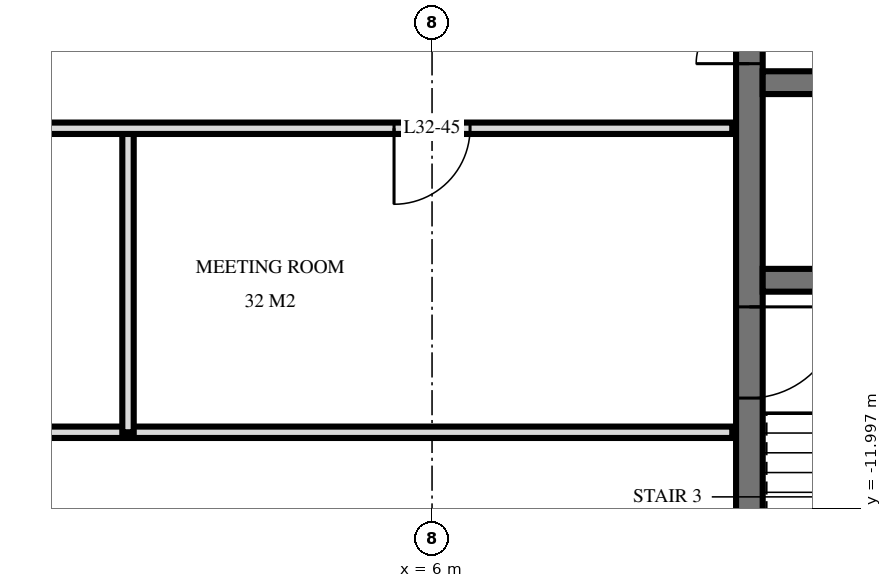
"""IFC4 building model, lengths in metres.
Left out: names, types, materials, properties, quantities, classifications, styles, units other than length and angle.
Written with IfcOpenShell. Run it as: python <this file> out.ifc"""

import sys

from ifc_helpers import new_model, si_unit, direction, frame, frame_2d, origin, place, context, subcontext, project, spatial, rectangle, extrude, element, fill, save


model = new_model("IFC4")
c1 = context("Model", 3, precision=1e-05, world=origin(), true_north=direction((0.0, 1.0)))
c2 = subcontext(c1, "Body", "Model", "MODEL_VIEW")
j1 = project(units=[si_unit("LENGTHUNIT", "METRE"), si_unit("PLANEANGLEUNIT", "RADIAN")], contexts=[c1])
p1 = place(None, origin())
s1 = spatial("IfcSite", under=j1, at=p1, CompositionType="ELEMENT")
p2 = place(p1, origin())
s2 = spatial("IfcBuilding", under=s1, at=p2, CompositionType="ELEMENT")
p3 = place(p2, frame((0.0, 0.0, 127.2)))
s3 = spatial("IfcBuildingStorey", under=s2, at=p3, CompositionType="ELEMENT", Elevation=127.2)
p4 = place(p3, frame((10.175, -14.55, 0.0), z_axis=(0.0, 0.0, 1.0), x_axis=(0.0, 1.0, 0.0)))
e1 = element("IfcWall", 1, at=p4, inside=s3, PredefinedType="SHEAR", context=c2, shape_type="SweptSolid", body=[
    extrude(rectangle(XDim=14.1, YDim=0.35, at=frame_2d((7.05, 0.0))), origin(), (0.0, 0.0, 1.0), 3.6),
])
p5 = place(p4, frame((8.4, 0.0, 0.0)))
e2 = element("IfcOpeningElement", 2, at=p5, cuts=e1, PredefinedType="OPENING", context=c2, shape_type="SweptSolid", body=[
    extrude(rectangle(XDim=1.4, YDim=2.4, at=frame_2d((0.7, 1.2))), frame((0.0, 0.185, 0.0), z_axis=(0.0, -1.0, 0.0), x_axis=(1.0, 0.0, 0.0)), (0.0, 0.0, 1.0), 0.37),
])
p6 = place(p4, frame((10.0, 0.0, 0.0)))
e3 = element("IfcOpeningElement", 3, at=p6, cuts=e1, PredefinedType="OPENING", context=c2, shape_type="SweptSolid", body=[
    extrude(rectangle(XDim=1.4, YDim=2.4, at=frame_2d((0.7, 1.2))), frame((0.0, 0.185, 0.0), z_axis=(0.0, -1.0, 0.0), x_axis=(1.0, 0.0, 0.0)), (0.0, 0.0, 1.0), 0.37),
])
p7 = place(p4, frame((4.0, 0.0, 0.0)))
e4 = element("IfcOpeningElement", 4, at=p7, cuts=e1, PredefinedType="OPENING", context=c2, shape_type="SweptSolid", body=[
    extrude(rectangle(XDim=1.2, YDim=2.1, at=frame_2d((0.6, 1.05))), frame((0.0, 0.185, 0.0), z_axis=(0.0, -1.0, 0.0), x_axis=(1.0, 0.0, 0.0)), (0.0, 0.0, 1.0), 0.37),
])
p8 = place(p3, frame((10.35, -6.4, 0.0), z_axis=(0.0, 0.0, 1.0), x_axis=(1.0, 0.0, 0.0)))
e5 = element("IfcWall", 5, at=p8, inside=s3, PredefinedType="SHEAR", context=c2, shape_type="SweptSolid", body=[
    extrude(rectangle(XDim=13.7, YDim=0.3, at=frame_2d((6.85, 0.0))), origin(), (0.0, 0.0, 1.0), 3.6),
])
p9 = place(p8, frame((12.05, 0.0, 0.0)))
e6 = element("IfcOpeningElement", 6, at=p9, cuts=e5, PredefinedType="OPENING", context=c2, shape_type="SweptSolid", body=[
    extrude(rectangle(XDim=1.1, YDim=2.1, at=frame_2d((0.55, 1.05))), frame((0.0, 0.16, 0.0), z_axis=(0.0, -1.0, 0.0), x_axis=(1.0, 0.0, 0.0)), (0.0, 0.0, 1.0), 0.32),
])
p10 = place(p8, frame((6.8, 0.0, 0.0)))
e7 = element("IfcOpeningElement", 7, at=p10, cuts=e5, PredefinedType="OPENING", context=c2, shape_type="SweptSolid", body=[
    extrude(rectangle(XDim=1.1, YDim=2.1, at=frame_2d((0.55, 1.05))), frame((0.0, 0.16, 0.0), z_axis=(0.0, -1.0, 0.0), x_axis=(1.0, 0.0, 0.0)), (0.0, 0.0, 1.0), 0.32),
])
p11 = place(p3, frame((10.35, -9.0, 0.0), z_axis=(0.0, 0.0, 1.0), x_axis=(1.0, 0.0, 0.0)))
e8 = element("IfcWall", 8, at=p11, inside=s3, PredefinedType="SHEAR", context=c2, shape_type="SweptSolid", body=[
    extrude(rectangle(XDim=13.7, YDim=0.3, at=frame_2d((6.85, 0.0))), origin(), (0.0, 0.0, 1.0), 3.6),
])
p12 = place(p11, frame((3.8, 0.0, 0.0)))
e9 = element("IfcOpeningElement", 9, at=p12, cuts=e8, PredefinedType="OPENING", context=c2, shape_type="SweptSolid", body=[
    extrude(rectangle(XDim=1.1, YDim=2.1, at=frame_2d((0.55, 1.05))), frame((0.0, 0.16, 0.0), z_axis=(0.0, -1.0, 0.0), x_axis=(1.0, 0.0, 0.0)), (0.0, 0.0, 1.0), 0.32),
])
p13 = place(p3, frame((2.0, -11.0, 0.0), z_axis=(0.0, 0.0, 1.0), x_axis=(0.0, 1.0, 0.0)))
e10 = element("IfcWall", 10, at=p13, inside=s3, PredefinedType="PARTITIONING", context=c2, shape_type="SweptSolid", body=[
    extrude(rectangle(XDim=4.0, YDim=0.15, at=frame_2d((2.0, 0.0))), origin(), (0.0, 0.0, 1.0), 3.32),
])
p14 = place(p3, frame((-9.95, -11.0, 0.0), z_axis=(0.0, 0.0, 1.0), x_axis=(1.0, 0.0, 0.0)))
e11 = element("IfcWall", 11, at=p14, inside=s3, PredefinedType="PARTITIONING", context=c2, shape_type="SweptSolid", body=[
    extrude(rectangle(XDim=19.9, YDim=0.15, at=frame_2d((9.95, 0.0))), origin(), (0.0, 0.0, 1.0), 3.32),
])
p15 = place(p14, frame((9.45, 0.0, 0.0)))
e12 = element("IfcOpeningElement", 12, at=p15, cuts=e11, PredefinedType="OPENING", context=c2, shape_type="SweptSolid", body=[
    extrude(rectangle(XDim=1.0, YDim=2.1, at=frame_2d((0.5, 1.05))), frame((0.0, 0.085, 0.0), z_axis=(0.0, -1.0, 0.0), x_axis=(1.0, 0.0, 0.0)), (0.0, 0.0, 1.0), 0.17),
])
p16 = place(p14, frame((3.45, 0.0, 0.0)))
e13 = element("IfcOpeningElement", 13, at=p16, cuts=e11, PredefinedType="OPENING", context=c2, shape_type="SweptSolid", body=[
    extrude(rectangle(XDim=1.0, YDim=2.1, at=frame_2d((0.5, 1.05))), frame((0.0, 0.085, 0.0), z_axis=(0.0, -1.0, 0.0), x_axis=(1.0, 0.0, 0.0)), (0.0, 0.0, 1.0), 0.17),
])
p17 = place(p3, frame((-9.95, -7.0, 0.0), z_axis=(0.0, 0.0, 1.0), x_axis=(1.0, 0.0, 0.0)))
e14 = element("IfcWall", 14, at=p17, inside=s3, PredefinedType="PARTITIONING", context=c2, shape_type="SweptSolid", body=[
    extrude(rectangle(XDim=19.9, YDim=0.15, at=frame_2d((9.95, 0.0))), origin(), (0.0, 0.0, 1.0), 3.32),
])
p18 = place(p17, frame((9.45, 0.0, 0.0)))
e15 = element("IfcOpeningElement", 15, at=p18, cuts=e14, PredefinedType="OPENING", context=c2, shape_type="SweptSolid", body=[
    extrude(rectangle(XDim=1.0, YDim=2.1, at=frame_2d((0.5, 1.05))), frame((0.0, 0.085, 0.0), z_axis=(0.0, -1.0, 0.0), x_axis=(1.0, 0.0, 0.0)), (0.0, 0.0, 1.0), 0.17),
])
p19 = place(p17, frame((15.45, 0.0, 0.0)))
e16 = element("IfcOpeningElement", 16, at=p19, cuts=e14, PredefinedType="OPENING", context=c2, shape_type="SweptSolid", body=[
    extrude(rectangle(XDim=1.0, YDim=2.1, at=frame_2d((0.5, 1.05))), frame((0.0, 0.085, 0.0), z_axis=(0.0, -1.0, 0.0), x_axis=(1.0, 0.0, 0.0)), (0.0, 0.0, 1.0), 0.17),
])
p20 = place(p5, origin())
e17 = element("IfcDoor", 17, at=p20, inside=s3, OperationType="DOUBLE_DOOR_SINGLE_SWING", PredefinedType="DOOR", context=c2, shape_type="SweptSolid", body=[
    extrude(rectangle(XDim=1.4, YDim=2.4, at=frame_2d((0.7, 1.2))), frame((0.0, 0.025, 0.0), z_axis=(0.0, -1.0, 0.0), x_axis=(1.0, 0.0, 0.0)), (0.0, 0.0, 1.0), 0.05),
])
fill(e2, e17)
p21 = place(p7, frame((0.6, 0.0, 0.0), z_axis=(0.0, 0.0, 1.0), x_axis=(-1.0, 0.0, 0.0)))
e18 = element("IfcDoor", 18, at=p21, inside=s3, OperationType="SINGLE_SWING_RIGHT", PredefinedType="DOOR", context=c2, shape_type="SweptSolid", body=[
    extrude(rectangle(XDim=1.2, YDim=2.1, at=frame_2d((0.0, 1.05))), frame((0.0, -0.025, 0.0), z_axis=(0.0, 1.0, 0.0), x_axis=(-1.0, 0.0, 0.0)), (0.0, 0.0, 1.0), 0.05),
])
fill(e4, e18)
p22 = place(p19, frame((0.5, 0.0, 0.0), z_axis=(0.0, 0.0, 1.0), x_axis=(-1.0, 0.0, 0.0)))
e19 = element("IfcDoor", 19, at=p22, inside=s3, OperationType="SINGLE_SWING_LEFT", PredefinedType="DOOR", context=c2, shape_type="SweptSolid", body=[
    extrude(rectangle(XDim=1.0, YDim=2.1, at=frame_2d((0.0, 1.05))), frame((0.0, -0.025, 0.0), z_axis=(0.0, 1.0, 0.0), x_axis=(-1.0, 0.0, 0.0)), (0.0, 0.0, 1.0), 0.05),
])
fill(e16, e19)
save(model, sys.argv[1])
